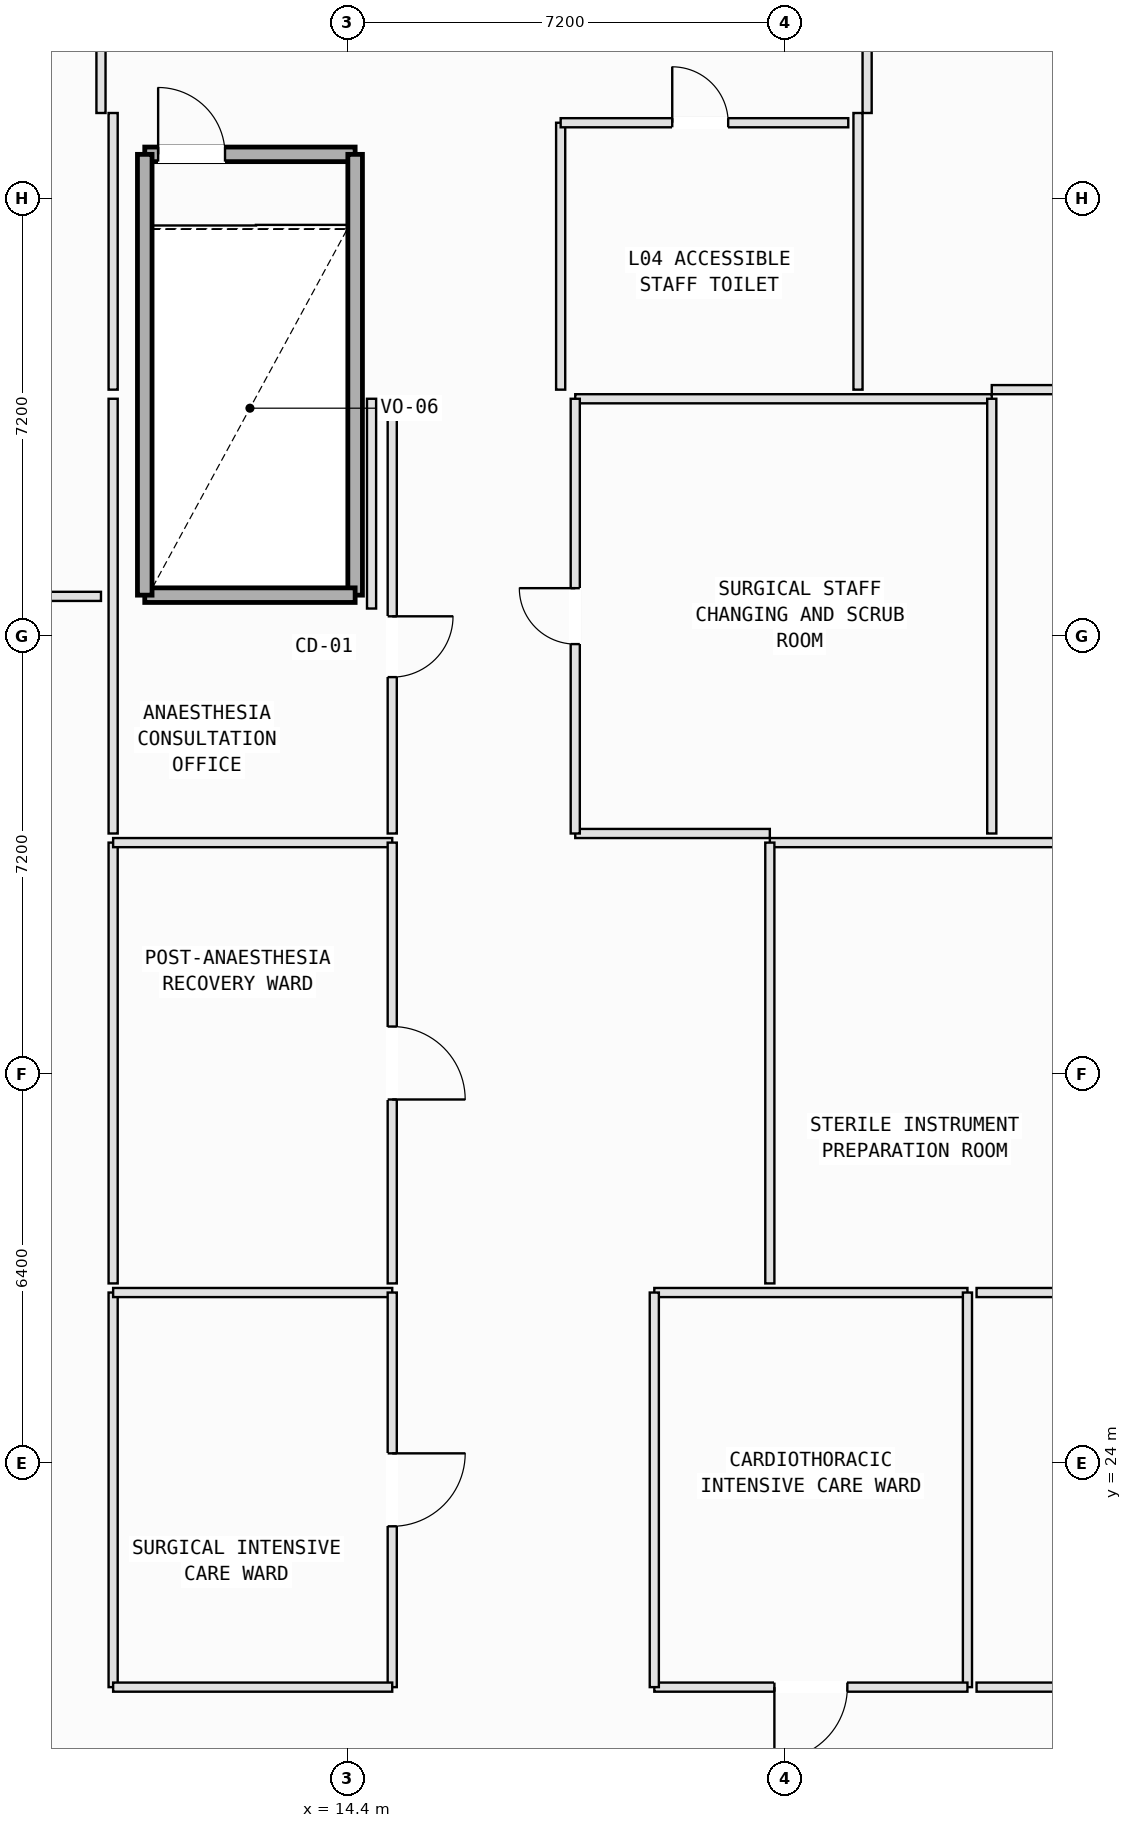
"""IFC4 building model, lengths in metres.
Left out: names, types, materials, properties, quantities, classifications, styles, units other than length and angle.
Written with IfcOpenShell. Run it as: python <this file> out.ifc"""

import sys

from ifc_helpers import new_model, si_unit, direction, frame, frame_2d, origin, place, context, subcontext, project, spatial, rectangle, extrude, element, fill, save


model = new_model("IFC4")
c1 = context("Model", 3, precision=1e-05, world=origin(), true_north=direction((0.0, 1.0)))
c2 = subcontext(c1, "Body", "Model", "MODEL_VIEW")
j1 = project(units=[si_unit("LENGTHUNIT", "METRE"), si_unit("PLANEANGLEUNIT", "RADIAN")], contexts=[c1])
p1 = place(None, origin())
s1 = spatial("IfcSite", under=j1, at=p1, CompositionType="ELEMENT")
p2 = place(p1, origin())
s2 = spatial("IfcBuilding", under=s1, at=p2, CompositionType="ELEMENT")
p3 = place(p2, frame((0.0, 0.0, 21.6)))
s3 = spatial("IfcBuildingStorey", under=s2, at=p3, CompositionType="ELEMENT", Elevation=21.6)
p4 = place(p3, frame((11.07, 45.52, 0.0), z_axis=(0.0, 0.0, 1.0), x_axis=(1.0, 0.0, 0.0)))
e1 = element("IfcWall", 1, at=p4, inside=s3, PredefinedType="SOLIDWALL", context=c2, shape_type="SweptSolid", body=[
    extrude(rectangle(XDim=3.46, YDim=0.24, at=frame_2d((1.73, 0.0))), origin(), (0.0, 0.0, 1.0), 5.1),
])
p5 = place(p4, frame((0.22, 0.0, 0.0)))
e2 = element("IfcOpeningElement", 2, at=p5, cuts=e1, PredefinedType="OPENING", context=c2, shape_type="SweptSolid", body=[
    extrude(rectangle(XDim=1.1, YDim=2.15, at=frame_2d((0.55, 1.075))), frame((0.0, 0.13, 0.0), z_axis=(0.0, -1.0, 0.0), x_axis=(1.0, 0.0, 0.0)), (0.0, 0.0, 1.0), 0.26),
])
p6 = place(p3, frame((14.53, 45.52, 0.0), z_axis=(0.0, 0.0, 1.0), x_axis=(0.0, -1.0, 0.0)))
e3 = element("IfcWall", 3, at=p6, inside=s3, PredefinedType="SOLIDWALL", context=c2, shape_type="SweptSolid", body=[
    extrude(rectangle(XDim=7.25, YDim=0.24, at=frame_2d((3.625, 0.0))), origin(), (0.0, 0.0, 1.0), 5.1),
])
p7 = place(p3, frame((14.53, 38.27, 0.0), z_axis=(0.0, 0.0, 1.0), x_axis=(-1.0, 0.0, 0.0)))
e4 = element("IfcWall", 4, at=p7, inside=s3, PredefinedType="SOLIDWALL", context=c2, shape_type="SweptSolid", body=[
    extrude(rectangle(XDim=3.46, YDim=0.24, at=frame_2d((1.73, 0.0))), origin(), (0.0, 0.0, 1.0), 5.1),
])
p8 = place(p3, frame((11.07, 38.27, 0.0), z_axis=(0.0, 0.0, 1.0), x_axis=(0.0, 1.0, 0.0)))
e5 = element("IfcWall", 5, at=p8, inside=s3, PredefinedType="SOLIDWALL", context=c2, shape_type="SweptSolid", body=[
    extrude(rectangle(XDim=7.25, YDim=0.24, at=frame_2d((3.625, 0.0))), origin(), (0.0, 0.0, 1.0), 5.1),
])
p9 = place(p3, frame((10.55, 20.31, 0.0), z_axis=(0.0, 0.0, 1.0), x_axis=(0.0, 1.0, 0.0)))
e6 = element("IfcWall", 6, at=p9, inside=s3, PredefinedType="PARTITIONING", context=c2, shape_type="SweptSolid", body=[
    extrude(rectangle(XDim=6.49, YDim=0.15, at=frame_2d((3.245, 0.0))), origin(), (0.0, 0.0, 1.0), 5.1),
])
p10 = place(p3, frame((10.55, 26.8, 0.0), z_axis=(0.0, 0.0, 1.0), x_axis=(1.0, 0.0, 0.0)))
e7 = element("IfcWall", 7, at=p10, inside=s3, PredefinedType="PARTITIONING", context=c2, shape_type="SweptSolid", body=[
    extrude(rectangle(XDim=4.59, YDim=0.15, at=frame_2d((2.295, 0.0))), origin(), (0.0, 0.0, 1.0), 5.1),
])
p11 = place(p3, frame((15.14, 26.8, 0.0), z_axis=(0.0, 0.0, 1.0), x_axis=(0.0, -1.0, 0.0)))
e8 = element("IfcWall", 8, at=p11, inside=s3, PredefinedType="PARTITIONING", context=c2, shape_type="SweptSolid", body=[
    extrude(rectangle(XDim=6.49, YDim=0.15, at=frame_2d((3.245, 0.0))), origin(), (0.0, 0.0, 1.0), 5.1),
])
p12 = place(p11, frame((2.645, 0.0, 0.0)))
e9 = element("IfcOpeningElement", 9, at=p12, cuts=e8, PredefinedType="OPENING", context=c2, shape_type="SweptSolid", body=[
    extrude(rectangle(XDim=1.2, YDim=2.15, at=frame_2d((0.6, 1.075))), frame((0.0, 0.085, 0.0), z_axis=(0.0, -1.0, 0.0), x_axis=(1.0, 0.0, 0.0)), (0.0, 0.0, 1.0), 0.17),
])
p13 = place(p3, frame((15.14, 20.31, 0.0), z_axis=(0.0, 0.0, 1.0), x_axis=(-1.0, 0.0, 0.0)))
e10 = element("IfcWall", 10, at=p13, inside=s3, PredefinedType="PARTITIONING", context=c2, shape_type="SweptSolid", body=[
    extrude(rectangle(XDim=4.59, YDim=0.15, at=frame_2d((2.295, 0.0))), origin(), (0.0, 0.0, 1.0), 5.1),
])
p14 = place(p3, frame((19.45, 26.8, 0.0), z_axis=(0.0, 0.0, 1.0), x_axis=(1.0, 0.0, 0.0)))
e11 = element("IfcWall", 11, at=p14, inside=s3, PredefinedType="PARTITIONING", context=c2, shape_type="SweptSolid", body=[
    extrude(rectangle(XDim=5.15, YDim=0.15, at=frame_2d((2.575, 0.0))), origin(), (0.0, 0.0, 1.0), 5.1),
])
p15 = place(p3, frame((24.6, 26.8, 0.0), z_axis=(0.0, 0.0, 1.0), x_axis=(0.0, -1.0, 0.0)))
e12 = element("IfcWall", 12, at=p15, inside=s3, PredefinedType="PARTITIONING", context=c2, shape_type="SweptSolid", body=[
    extrude(rectangle(XDim=6.49, YDim=0.15, at=frame_2d((3.245, 0.0))), origin(), (0.0, 0.0, 1.0), 5.1),
])
p16 = place(p3, frame((24.6, 20.31, 0.0), z_axis=(0.0, 0.0, 1.0), x_axis=(-1.0, 0.0, 0.0)))
e13 = element("IfcWall", 13, at=p16, inside=s3, PredefinedType="PARTITIONING", context=c2, shape_type="SweptSolid", body=[
    extrude(rectangle(XDim=5.15, YDim=0.15, at=frame_2d((2.575, 0.0))), origin(), (0.0, 0.0, 1.0), 5.1),
])
p17 = place(p16, frame((1.975, 0.0, 0.0)))
e14 = element("IfcOpeningElement", 14, at=p17, cuts=e13, PredefinedType="OPENING", context=c2, shape_type="SweptSolid", body=[
    extrude(rectangle(XDim=1.2, YDim=2.15, at=frame_2d((0.6, 1.075))), frame((0.0, 0.085, 0.0), z_axis=(0.0, -1.0, 0.0), x_axis=(1.0, 0.0, 0.0)), (0.0, 0.0, 1.0), 0.17),
])
p18 = place(p3, frame((19.45, 20.31, 0.0), z_axis=(0.0, 0.0, 1.0), x_axis=(0.0, 1.0, 0.0)))
e15 = element("IfcWall", 15, at=p18, inside=s3, PredefinedType="PARTITIONING", context=c2, shape_type="SweptSolid", body=[
    extrude(rectangle(XDim=6.49, YDim=0.15, at=frame_2d((3.245, 0.0))), origin(), (0.0, 0.0, 1.0), 5.1),
])
p19 = place(p3, frame((24.75, 26.8, 0.0), z_axis=(0.0, 0.0, 1.0), x_axis=(1.0, 0.0, 0.0)))
e16 = element("IfcWall", 16, at=p19, inside=s3, PredefinedType="PARTITIONING", context=c2, shape_type="SweptSolid", body=[
    extrude(rectangle(XDim=7.05, YDim=0.15, at=frame_2d((3.525, 0.0))), origin(), (0.0, 0.0, 1.0), 5.1),
])
p20 = place(p3, frame((31.8, 20.31, 0.0), z_axis=(0.0, 0.0, 1.0), x_axis=(-1.0, 0.0, 0.0)))
e17 = element("IfcWall", 17, at=p20, inside=s3, PredefinedType="PARTITIONING", context=c2, shape_type="SweptSolid", body=[
    extrude(rectangle(XDim=7.05, YDim=0.15, at=frame_2d((3.525, 0.0))), origin(), (0.0, 0.0, 1.0), 5.1),
])
p21 = place(p20, frame((2.925, 0.0, 0.0)))
e18 = element("IfcOpeningElement", 18, at=p21, cuts=e17, PredefinedType="OPENING", context=c2, shape_type="SweptSolid", body=[
    extrude(rectangle(XDim=1.2, YDim=2.15, at=frame_2d((0.6, 1.075))), frame((0.0, 0.085, 0.0), z_axis=(0.0, -1.0, 0.0), x_axis=(1.0, 0.0, 0.0)), (0.0, 0.0, 1.0), 0.17),
])
p22 = place(p3, frame((10.55, 26.95, 0.0), z_axis=(0.0, 0.0, 1.0), x_axis=(0.0, 1.0, 0.0)))
e19 = element("IfcWall", 19, at=p22, inside=s3, PredefinedType="PARTITIONING", context=c2, shape_type="SweptSolid", body=[
    extrude(rectangle(XDim=7.25, YDim=0.15, at=frame_2d((3.625, 0.0))), origin(), (0.0, 0.0, 1.0), 5.1),
])
p23 = place(p3, frame((10.55, 34.2, 0.0), z_axis=(0.0, 0.0, 1.0), x_axis=(1.0, 0.0, 0.0)))
e20 = element("IfcWall", 20, at=p23, inside=s3, PredefinedType="PARTITIONING", context=c2, shape_type="SweptSolid", body=[
    extrude(rectangle(XDim=4.59, YDim=0.15, at=frame_2d((2.295, 0.0))), origin(), (0.0, 0.0, 1.0), 5.1),
])
p24 = place(p3, frame((15.14, 34.2, 0.0), z_axis=(0.0, 0.0, 1.0), x_axis=(0.0, -1.0, 0.0)))
e21 = element("IfcWall", 21, at=p24, inside=s3, PredefinedType="PARTITIONING", context=c2, shape_type="SweptSolid", body=[
    extrude(rectangle(XDim=7.25, YDim=0.15, at=frame_2d((3.625, 0.0))), origin(), (0.0, 0.0, 1.0), 5.1),
])
p25 = place(p24, frame((3.025, 0.0, 0.0)))
e22 = element("IfcOpeningElement", 22, at=p25, cuts=e21, PredefinedType="OPENING", context=c2, shape_type="SweptSolid", body=[
    extrude(rectangle(XDim=1.2, YDim=2.15, at=frame_2d((0.6, 1.075))), frame((0.0, 0.085, 0.0), z_axis=(0.0, -1.0, 0.0), x_axis=(1.0, 0.0, 0.0)), (0.0, 0.0, 1.0), 0.17),
])
p26 = place(p3, frame((21.35, 34.2, 0.0), z_axis=(0.0, 0.0, 1.0), x_axis=(1.0, 0.0, 0.0)))
e23 = element("IfcWall", 23, at=p26, inside=s3, PredefinedType="PARTITIONING", context=c2, shape_type="SweptSolid", body=[
    extrude(rectangle(XDim=10.45, YDim=0.15, at=frame_2d((5.225, 0.0))), origin(), (0.0, 0.0, 1.0), 5.1),
])
p27 = place(p3, frame((21.35, 26.95, 0.0), z_axis=(0.0, 0.0, 1.0), x_axis=(0.0, 1.0, 0.0)))
e24 = element("IfcWall", 24, at=p27, inside=s3, PredefinedType="PARTITIONING", context=c2, shape_type="SweptSolid", body=[
    extrude(rectangle(XDim=7.25, YDim=0.15, at=frame_2d((3.625, 0.0))), origin(), (0.0, 0.0, 1.0), 5.1),
])
p28 = place(p3, frame((10.55, 34.35, 0.0), z_axis=(0.0, 0.0, 1.0), x_axis=(0.0, 1.0, 0.0)))
e25 = element("IfcWall", 25, at=p28, inside=s3, PredefinedType="PARTITIONING", context=c2, shape_type="SweptSolid", body=[
    extrude(rectangle(XDim=7.15, YDim=0.15, at=frame_2d((3.575, 0.0))), origin(), (0.0, 0.0, 1.0), 5.1),
])
p29 = place(p3, frame((14.8, 38.05, 0.0), z_axis=(0.0, 0.0, 1.0), x_axis=(0.0, 1.0, 0.0)))
e26 = element("IfcWall", 26, at=p29, inside=s3, PredefinedType="PARTITIONING", context=c2, shape_type="SweptSolid", body=[
    extrude(rectangle(XDim=3.45, YDim=0.15, at=frame_2d((1.725, 0.0))), origin(), (0.0, 0.0, 1.0), 5.1),
])
p30 = place(p3, frame((15.14, 41.5, 0.0), z_axis=(0.0, 0.0, 1.0), x_axis=(0.0, -1.0, 0.0)))
e27 = element("IfcWall", 27, at=p30, inside=s3, PredefinedType="PARTITIONING", context=c2, shape_type="SweptSolid", body=[
    extrude(rectangle(XDim=7.15, YDim=0.15, at=frame_2d((3.575, 0.0))), origin(), (0.0, 0.0, 1.0), 5.1),
])
p31 = place(p30, frame((3.578, 0.0, 0.0)))
e28 = element("IfcOpeningElement", 28, at=p31, cuts=e27, PredefinedType="OPENING", context=c2, shape_type="SweptSolid", body=[
    extrude(rectangle(XDim=1.0, YDim=2.12, at=frame_2d((0.5, 1.06))), frame((0.0, 0.085, 0.0), z_axis=(0.0, -1.0, 0.0), x_axis=(1.0, 0.0, 0.0)), (0.0, 0.0, 1.0), 0.17),
])
p32 = place(p3, frame((18.15, 41.5, 0.0), z_axis=(0.0, 0.0, 1.0), x_axis=(1.0, 0.0, 0.0)))
e29 = element("IfcWall", 29, at=p32, inside=s3, PredefinedType="PARTITIONING", context=c2, shape_type="SweptSolid", body=[
    extrude(rectangle(XDim=6.85, YDim=0.15, at=frame_2d((3.425, 0.0))), origin(), (0.0, 0.0, 1.0), 5.1),
])
p33 = place(p3, frame((25.0, 41.5, 0.0), z_axis=(0.0, 0.0, 1.0), x_axis=(0.0, -1.0, 0.0)))
e30 = element("IfcWall", 30, at=p33, inside=s3, PredefinedType="PARTITIONING", context=c2, shape_type="SweptSolid", body=[
    extrude(rectangle(XDim=7.15, YDim=0.15, at=frame_2d((3.575, 0.0))), origin(), (0.0, 0.0, 1.0), 5.1),
])
p34 = place(p3, frame((21.35, 34.35, 0.0), z_axis=(0.0, 0.0, 1.0), x_axis=(-1.0, 0.0, 0.0)))
e31 = element("IfcWall", 31, at=p34, inside=s3, PredefinedType="PARTITIONING", context=c2, shape_type="SweptSolid", body=[
    extrude(rectangle(XDim=3.2, YDim=0.15, at=frame_2d((1.6, 0.0))), origin(), (0.0, 0.0, 1.0), 5.1),
])
p35 = place(p3, frame((18.15, 34.35, 0.0), z_axis=(0.0, 0.0, 1.0), x_axis=(0.0, 1.0, 0.0)))
e32 = element("IfcWall", 32, at=p35, inside=s3, PredefinedType="PARTITIONING", context=c2, shape_type="SweptSolid", body=[
    extrude(rectangle(XDim=7.15, YDim=0.15, at=frame_2d((3.575, 0.0))), origin(), (0.0, 0.0, 1.0), 5.1),
])
p36 = place(p35, frame((3.115, 0.0, 0.0)))
e33 = element("IfcOpeningElement", 33, at=p36, cuts=e32, PredefinedType="OPENING", context=c2, shape_type="SweptSolid", body=[
    extrude(rectangle(XDim=0.92, YDim=2.1, at=frame_2d((0.46, 1.05))), frame((0.0, 0.085, 0.0), z_axis=(0.0, -1.0, 0.0), x_axis=(1.0, 0.0, 0.0)), (0.0, 0.0, 1.0), 0.17),
])
for number, where, z_axis, x_axis in (
    (34, (10.55, 41.65, 0.0), (0.0, 0.0, 1.0), (0.0, 1.0, 0.0)),
    (35, (22.8, 46.2, 0.0), (0.0, 0.0, 1.0), (0.0, -1.0, 0.0)),
):
    element("IfcWall", number, at=place(p3, frame(where, z_axis=z_axis, x_axis=x_axis)), inside=s3, PredefinedType="PARTITIONING", context=c2, shape_type="SweptSolid", body=[
        extrude(rectangle(XDim=4.55, YDim=0.15, at=frame_2d((2.275, 0.0))), origin(), (0.0, 0.0, 1.0), 5.1),
    ])
p37 = place(p3, frame((17.91, 41.65, 0.0), z_axis=(0.0, 0.0, 1.0), x_axis=(0.0, 1.0, 0.0)))
e36 = element("IfcWall", 36, at=p37, inside=s3, PredefinedType="PARTITIONING", context=c2, shape_type="SweptSolid", body=[
    extrude(rectangle(XDim=4.39, YDim=0.15, at=frame_2d((2.195, 0.0))), origin(), (0.0, 0.0, 1.0), 5.1),
])
p38 = place(p3, frame((17.91, 46.04, 0.0), z_axis=(0.0, 0.0, 1.0), x_axis=(1.0, 0.0, 0.0)))
e37 = element("IfcWall", 37, at=p38, inside=s3, PredefinedType="PARTITIONING", context=c2, shape_type="SweptSolid", body=[
    extrude(rectangle(XDim=4.73, YDim=0.15, at=frame_2d((2.365, 0.0))), origin(), (0.0, 0.0, 1.0), 5.1),
])
p39 = place(p38, frame((1.835, 0.0, 0.0)))
e38 = element("IfcOpeningElement", 38, at=p39, cuts=e37, PredefinedType="OPENING", context=c2, shape_type="SweptSolid", body=[
    extrude(rectangle(XDim=0.92, YDim=2.1, at=frame_2d((0.46, 1.05))), frame((0.0, 0.085, 0.0), z_axis=(0.0, -1.0, 0.0), x_axis=(1.0, 0.0, 0.0)), (0.0, 0.0, 1.0), 0.17),
])
p40 = place(p3, frame((30.35, 41.65, 0.0), z_axis=(0.0, 0.0, 1.0), x_axis=(-1.0, 0.0, 0.0)))
e39 = element("IfcWall", 39, at=p40, inside=s3, PredefinedType="PARTITIONING", context=c2, shape_type="SweptSolid", body=[
    extrude(rectangle(XDim=5.35, YDim=0.15, at=frame_2d((2.675, 0.0))), origin(), (0.0, 0.0, 1.0), 5.1),
])
p41 = place(p3, frame((22.95, 46.2, 0.0), z_axis=(0.0, 0.0, 1.0), x_axis=(0.0, 1.0, 0.0)))
e40 = element("IfcWall", 40, at=p41, inside=s3, PredefinedType="PARTITIONING", context=c2, shape_type="SweptSolid", body=[
    extrude(rectangle(XDim=3.3, YDim=0.15, at=frame_2d((1.65, 0.0))), origin(), (0.0, 0.0, 1.0), 5.1),
])
p42 = place(p41, frame((1.19, 0.0, 0.0)))
e41 = element("IfcOpeningElement", 41, at=p42, cuts=e40, PredefinedType="OPENING", context=c2, shape_type="SweptSolid", body=[
    extrude(rectangle(XDim=0.92, YDim=2.1, at=frame_2d((0.46, 1.05))), frame((0.0, 0.085, 0.0), z_axis=(0.0, -1.0, 0.0), x_axis=(1.0, 0.0, 0.0)), (0.0, 0.0, 1.0), 0.17),
])
p43 = place(p3, frame((10.35, 38.25, 0.0), z_axis=(0.0, 0.0, 1.0), x_axis=(-1.0, 0.0, 0.0)))
e42 = element("IfcWall", 42, at=p43, inside=s3, PredefinedType="PARTITIONING", context=c2, shape_type="SweptSolid", body=[
    extrude(rectangle(XDim=3.73, YDim=0.15, at=frame_2d((1.865, 0.0))), origin(), (0.0, 0.0, 1.0), 5.1),
])
p44 = place(p43, frame((1.405, 0.0, 0.0)))
e43 = element("IfcOpeningElement", 43, at=p44, cuts=e42, PredefinedType="OPENING", context=c2, shape_type="SweptSolid", body=[
    extrude(rectangle(XDim=0.92, YDim=2.1, at=frame_2d((0.46, 1.05))), frame((0.0, 0.085, 0.0), z_axis=(0.0, -1.0, 0.0), x_axis=(1.0, 0.0, 0.0)), (0.0, 0.0, 1.0), 0.17),
])
p45 = place(p3, frame((10.35, 49.5, 0.0), z_axis=(0.0, 0.0, 1.0), x_axis=(0.0, -1.0, 0.0)))
e44 = element("IfcWall", 44, at=p45, inside=s3, PredefinedType="PARTITIONING", context=c2, shape_type="SweptSolid", body=[
    extrude(rectangle(XDim=3.3, YDim=0.15, at=frame_2d((1.65, 0.0))), origin(), (0.0, 0.0, 1.0), 5.1),
])
p46 = place(p5, origin())
e45 = element("IfcDoor", 45, at=p46, inside=s3, OperationType="SINGLE_SWING_LEFT", PredefinedType="DOOR", context=c2, shape_type="SweptSolid", body=[
    extrude(rectangle(XDim=1.1, YDim=2.15, at=frame_2d((0.55, 1.075))), frame((0.0, 0.025, 0.0), z_axis=(0.0, -1.0, 0.0), x_axis=(1.0, 0.0, 0.0)), (0.0, 0.0, 1.0), 0.05),
])
fill(e2, e45)
p47 = place(p12, origin())
e46 = element("IfcDoor", 46, at=p47, inside=s3, OperationType="SINGLE_SWING_LEFT", PredefinedType="DOOR", context=c2, shape_type="SweptSolid", body=[
    extrude(rectangle(XDim=1.2, YDim=2.15, at=frame_2d((0.6, 1.075))), frame((0.0, 0.025, 0.0), z_axis=(0.0, -1.0, 0.0), x_axis=(1.0, 0.0, 0.0)), (0.0, 0.0, 1.0), 0.05),
])
fill(e9, e46)
p48 = place(p17, origin())
e47 = element("IfcDoor", 47, at=p48, inside=s3, OperationType="SINGLE_SWING_RIGHT", PredefinedType="DOOR", context=c2, shape_type="SweptSolid", body=[
    extrude(rectangle(XDim=1.2, YDim=2.15, at=frame_2d((0.6, 1.075))), frame((0.0, 0.025, 0.0), z_axis=(0.0, -1.0, 0.0), x_axis=(1.0, 0.0, 0.0)), (0.0, 0.0, 1.0), 0.05),
])
fill(e14, e47)
p49 = place(p25, origin())
e48 = element("IfcDoor", 48, at=p49, inside=s3, OperationType="SINGLE_SWING_RIGHT", PredefinedType="DOOR", context=c2, shape_type="SweptSolid", body=[
    extrude(rectangle(XDim=1.2, YDim=2.15, at=frame_2d((0.6, 1.075))), frame((0.0, 0.025, 0.0), z_axis=(0.0, -1.0, 0.0), x_axis=(1.0, 0.0, 0.0)), (0.0, 0.0, 1.0), 0.05),
])
fill(e22, e48)
p50 = place(p31, origin())
e49 = element("IfcDoor", 49, at=p50, inside=s3, OperationType="SINGLE_SWING_LEFT", PredefinedType="DOOR", context=c2, shape_type="SweptSolid", body=[
    extrude(rectangle(XDim=1.0, YDim=2.12, at=frame_2d((0.5, 1.06))), frame((0.0, 0.025, 0.0), z_axis=(0.0, -1.0, 0.0), x_axis=(1.0, 0.0, 0.0)), (0.0, 0.0, 1.0), 0.05),
])
fill(e28, e49)
p51 = place(p36, origin())
e50 = element("IfcDoor", 50, at=p51, inside=s3, OperationType="SINGLE_SWING_RIGHT", PredefinedType="DOOR", context=c2, shape_type="SweptSolid", body=[
    extrude(rectangle(XDim=0.92, YDim=2.1, at=frame_2d((0.46, 1.05))), frame((0.0, 0.025, 0.0), z_axis=(0.0, -1.0, 0.0), x_axis=(1.0, 0.0, 0.0)), (0.0, 0.0, 1.0), 0.05),
])
fill(e33, e50)
p52 = place(p39, origin())
e51 = element("IfcDoor", 51, at=p52, inside=s3, OperationType="SINGLE_SWING_LEFT", PredefinedType="DOOR", context=c2, shape_type="SweptSolid", body=[
    extrude(rectangle(XDim=0.92, YDim=2.1, at=frame_2d((0.46, 1.05))), frame((0.0, 0.025, 0.0), z_axis=(0.0, -1.0, 0.0), x_axis=(1.0, 0.0, 0.0)), (0.0, 0.0, 1.0), 0.05),
])
fill(e38, e51)
save(model, sys.argv[1])
